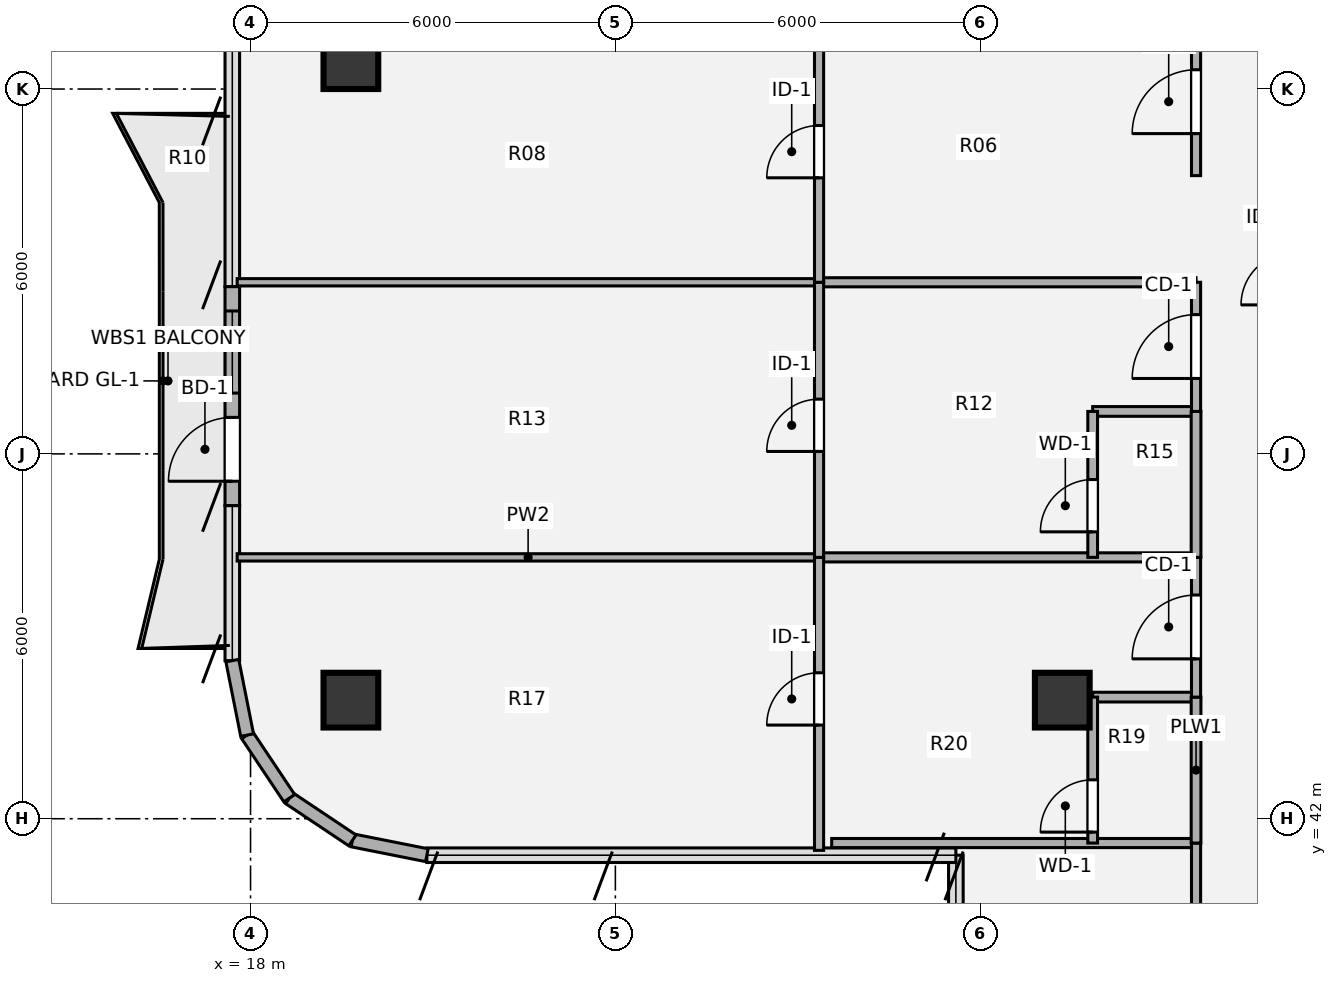
"""IFC4 building model, lengths in metres.
Left out: names, types, materials, properties, quantities, classifications, styles, units other than length and angle.
Written with IfcOpenShell. Run it as: python <this file> out.ifc"""

import sys

from ifc_helpers import new_model, si_unit, direction, frame, frame_2d, origin, origin_2d, place, context, subcontext, project, spatial, rectangle, hollow_circle, extrude, source, transform, mapped, element, fill, save


model = new_model("IFC4")
c1 = context("Model", 3, precision=1e-05, world=origin(), true_north=direction((0.0, 1.0)))
c2 = subcontext(c1, "Body", "Model", "MODEL_VIEW")
j1 = project(units=[si_unit("LENGTHUNIT", "METRE"), si_unit("PLANEANGLEUNIT", "RADIAN")], contexts=[c1])
p1 = place(None, origin())
s1 = spatial("IfcSite", under=j1, at=p1, CompositionType="ELEMENT")
p2 = place(p1, origin())
s2 = spatial("IfcBuilding", under=s1, at=p2, CompositionType="ELEMENT")
p3 = place(p2, frame((0.0, 0.0, 264.6)))
s3 = spatial("IfcBuildingStorey", under=s2, at=p3, CompositionType="ELEMENT", Elevation=264.6)
m1 = source(origin(), c2, "Body", "SweptSolid", [
    extrude(hollow_circle(Radius=0.45, WallThickness=0.032, at=origin_2d()), origin(), (0.0, 0.0, 1.0), 3.78),
])
for number, where, z_axis, x_axis in (
    (1, (19.65, 43.95, 0.0), (0.0, 0.0, 1.0), (1.0, 0.0, 0.0)),
    (2, (19.65, 54.45, 0.0), (0.0, 0.0, 1.0), (1.0, 0.0, 0.0)),
    (3, (31.35, 43.95, 0.0), (0.0, 0.0, 1.0), (1.0, 0.0, 0.0)),
):
    element("IfcColumn", number, at=place(p3, frame(where, z_axis=z_axis, x_axis=x_axis)), inside=s3, PredefinedType="COLUMN", context=c2, shape_type="MappedRepresentation", body=[
        mapped(m1, transform((0.0, 0.0, 0.0), x_axis=(1.0, 0.0, 0.0), y_axis=(0.0, 1.0, 0.0), z_axis=(0.0, 0.0, 1.0), scale=1.0)),
    ])
for number, where, z_axis, x_axis in (
    (4, (20.9, 41.4, 0.0), (0.0, 0.0, 1.0), (-0.981, 0.195, 0.0)),
    (5, (19.675, 41.644, 0.0), (0.0, 0.0, 1.0), (-0.831, 0.556, 0.0)),
    (6, (18.637, 42.337, 0.0), (0.0, 0.0, 1.0), (-0.556, 0.831, 0.0)),
    (7, (17.944, 43.375, 0.0), (0.0, 0.0, 1.0), (-0.195, 0.981, 0.0)),
):
    element("IfcWall", number, at=place(p3, frame(where, z_axis=z_axis, x_axis=x_axis)), inside=s3, PredefinedType="SOLIDWALL", context=c2, shape_type="SweptSolid", body=[
        extrude(rectangle(XDim=1.249, YDim=0.215, at=frame_2d((0.624, 0.0))), origin(), (0.0, 0.0, 1.0), 3.53),
    ])
p4 = place(p3, frame((17.7, 47.15, 0.0), z_axis=(0.0, 0.0, 1.0), x_axis=(0.0, 1.0, 0.0)))
e8 = element("IfcWall", 8, at=p4, inside=s3, PredefinedType="SOLIDWALL", context=c2, shape_type="SweptSolid", body=[
    extrude(rectangle(XDim=3.6, YDim=0.24, at=frame_2d((1.8, 0.0))), origin(), (0.0, 0.0, 1.0), 3.53),
])
p5 = place(p4, frame((0.4, 0.0, 0.0)))
e9 = element("IfcOpeningElement", 9, at=p5, cuts=e8, PredefinedType="OPENING", context=c2, shape_type="SweptSolid", body=[
    extrude(rectangle(XDim=1.05, YDim=2.15, at=origin_2d()), frame((0.525, 0.13, 1.075), z_axis=(0.0, -1.0, 0.0), x_axis=(1.0, 0.0, 0.0)), (0.0, 0.0, 1.0), 0.26),
])
p6 = place(p4, frame((1.85, 0.0, 0.85)))
e10 = element("IfcOpeningElement", 10, at=p6, cuts=e8, PredefinedType="OPENING", context=c2, shape_type="SweptSolid", body=[
    extrude(rectangle(XDim=1.35, YDim=1.35, at=origin_2d()), frame((0.675, 0.13, 0.675), z_axis=(0.0, -1.0, 0.0), x_axis=(1.0, 0.0, 0.0)), (0.0, 0.0, 1.0), 0.26),
])
p7 = place(p3, frame((27.558, 41.6, 0.0), z_axis=(0.0, 0.0, 1.0), x_axis=(1.0, 0.0, 0.0)))
e11 = element("IfcWall", 11, at=p7, inside=s3, PredefinedType="PARTITIONING", context=c2, shape_type="SweptSolid", body=[
    extrude(rectangle(XDim=5.992, YDim=0.15, at=frame_2d((2.996, 0.0))), origin(), (0.0, 0.0, 1.0), 3.5),
])
p8 = place(p3, frame((31.85, 44.0, 0.0), z_axis=(0.0, 0.0, 1.0), x_axis=(1.0, 0.0, 0.0)))
e12 = element("IfcWall", 12, at=p8, inside=s3, PredefinedType="PLUMBINGWALL", context=c2, shape_type="SweptSolid", body=[
    extrude(rectangle(XDim=1.7, YDim=0.16, at=frame_2d((0.85, 0.0))), origin(), (0.0, 0.0, 1.0), 2.903),
])
p9 = place(p3, frame((17.78, 46.298, 0.0), z_axis=(0.0, 0.0, 1.0), x_axis=(1.0, 0.0, 0.0)))
e13 = element("IfcWall", 13, at=p9, inside=s3, PredefinedType="PARTITIONING", context=c2, shape_type="SweptSolid", body=[
    extrude(rectangle(XDim=9.57, YDim=0.12, at=frame_2d((4.785, 0.0))), origin(), (0.0, 0.0, 1.0), 3.055),
])
p10 = place(p3, frame((27.35, 46.298, 0.0), z_axis=(0.0, 0.0, 1.0), x_axis=(1.0, 0.0, 0.0)))
e14 = element("IfcWall", 14, at=p10, inside=s3, PredefinedType="PARTITIONING", context=c2, shape_type="SweptSolid", body=[
    extrude(rectangle(XDim=6.2, YDim=0.15, at=frame_2d((3.1, 0.0))), origin(), (0.0, 0.0, 1.0), 3.055),
])
p11 = place(p3, frame((31.85, 48.698, 0.0), z_axis=(0.0, 0.0, 1.0), x_axis=(1.0, 0.0, 0.0)))
e15 = element("IfcWall", 15, at=p11, inside=s3, PredefinedType="PLUMBINGWALL", context=c2, shape_type="SweptSolid", body=[
    extrude(rectangle(XDim=1.7, YDim=0.16, at=frame_2d((0.85, 0.0))), origin(), (0.0, 0.0, 1.0), 3.259),
])
p12 = place(p3, frame((17.78, 50.822, 0.0), z_axis=(0.0, 0.0, 1.0), x_axis=(1.0, 0.0, 0.0)))
e16 = element("IfcWall", 16, at=p12, inside=s3, PredefinedType="PARTITIONING", context=c2, shape_type="SweptSolid", body=[
    extrude(rectangle(XDim=9.57, YDim=0.12, at=frame_2d((4.785, 0.0))), origin(), (0.0, 0.0, 1.0), 2.982),
])
p13 = place(p3, frame((27.35, 50.822, 0.0), z_axis=(0.0, 0.0, 1.0), x_axis=(1.0, 0.0, 0.0)))
e17 = element("IfcWall", 17, at=p13, inside=s3, PredefinedType="PARTITIONING", context=c2, shape_type="SweptSolid", body=[
    extrude(rectangle(XDim=6.2, YDim=0.15, at=frame_2d((3.1, 0.0))), origin(), (0.0, 0.0, 1.0), 2.982),
])
p14 = place(p3, frame((27.35, 41.48, 0.0), z_axis=(0.0, 0.0, 1.0), x_axis=(0.0, 1.0, 0.0)))
e18 = element("IfcWall", 18, at=p14, inside=s3, PredefinedType="PARTITIONING", context=c2, shape_type="SweptSolid", body=[
    extrude(rectangle(XDim=4.818, YDim=0.15, at=frame_2d((2.409, 0.0))), origin(), (0.0, 0.0, 1.0), 3.5),
])
p15 = place(p14, frame((2.06, 0.0, 0.0)))
e19 = element("IfcOpeningElement", 19, at=p15, cuts=e18, PredefinedType="OPENING", context=c2, shape_type="SweptSolid", body=[
    extrude(rectangle(XDim=0.86, YDim=2.1, at=origin_2d()), frame((0.43, 0.085, 1.05), z_axis=(0.0, -1.0, 0.0), x_axis=(1.0, 0.0, 0.0)), (0.0, 0.0, 1.0), 0.17),
])
p16 = place(p3, frame((27.35, 46.298, 0.0), z_axis=(0.0, 0.0, 1.0), x_axis=(0.0, 1.0, 0.0)))
e20 = element("IfcWall", 20, at=p16, inside=s3, PredefinedType="PARTITIONING", context=c2, shape_type="SweptSolid", body=[
    extrude(rectangle(XDim=4.524, YDim=0.15, at=frame_2d((2.262, 0.0))), origin(), (0.0, 0.0, 1.0), 3.5),
])
p17 = place(p16, frame((1.742, 0.0, 0.0)))
e21 = element("IfcOpeningElement", 21, at=p17, cuts=e20, PredefinedType="OPENING", context=c2, shape_type="SweptSolid", body=[
    extrude(rectangle(XDim=0.86, YDim=2.1, at=origin_2d()), frame((0.43, 0.085, 1.05), z_axis=(0.0, -1.0, 0.0), x_axis=(1.0, 0.0, 0.0)), (0.0, 0.0, 1.0), 0.17),
])
p18 = place(p3, frame((27.35, 50.822, 0.0), z_axis=(0.0, 0.0, 1.0), x_axis=(0.0, 1.0, 0.0)))
e22 = element("IfcWall", 22, at=p18, inside=s3, PredefinedType="PARTITIONING", context=c2, shape_type="SweptSolid", body=[
    extrude(rectangle(XDim=4.176, YDim=0.15, at=frame_2d((2.088, 0.0))), origin(), (0.0, 0.0, 1.0), 3.5),
])
p19 = place(p18, frame((1.718, 0.0, 0.0)))
e23 = element("IfcOpeningElement", 23, at=p19, cuts=e22, PredefinedType="OPENING", context=c2, shape_type="SweptSolid", body=[
    extrude(rectangle(XDim=0.86, YDim=2.1, at=origin_2d()), frame((0.43, 0.085, 1.05), z_axis=(0.0, -1.0, 0.0), x_axis=(1.0, 0.0, 0.0)), (0.0, 0.0, 1.0), 0.17),
])
p20 = place(p3, frame((31.85, 41.6, 0.0), z_axis=(0.0, 0.0, 1.0), x_axis=(0.0, 1.0, 0.0)))
e24 = element("IfcWall", 24, at=p20, inside=s3, PredefinedType="PLUMBINGWALL", context=c2, shape_type="SweptSolid", body=[
    extrude(rectangle(XDim=2.4, YDim=0.16, at=frame_2d((1.2, 0.0))), origin(), (0.0, 0.0, 1.0), 3.5),
])
p21 = place(p20, frame((0.18, 0.0, 0.0)))
e25 = element("IfcOpeningElement", 25, at=p21, cuts=e24, PredefinedType="OPENING", context=c2, shape_type="SweptSolid", body=[
    extrude(rectangle(XDim=0.86, YDim=2.1, at=origin_2d()), frame((0.43, 0.09, 1.05), z_axis=(0.0, -1.0, 0.0), x_axis=(1.0, 0.0, 0.0)), (0.0, 0.0, 1.0), 0.18),
])
p22 = place(p3, frame((31.85, 46.298, 0.0), z_axis=(0.0, 0.0, 1.0), x_axis=(0.0, 1.0, 0.0)))
e26 = element("IfcWall", 26, at=p22, inside=s3, PredefinedType="PLUMBINGWALL", context=c2, shape_type="SweptSolid", body=[
    extrude(rectangle(XDim=2.4, YDim=0.16, at=frame_2d((1.2, 0.0))), origin(), (0.0, 0.0, 1.0), 3.5),
])
p23 = place(p22, frame((0.42, 0.0, 0.0)))
e27 = element("IfcOpeningElement", 27, at=p23, cuts=e26, PredefinedType="OPENING", context=c2, shape_type="SweptSolid", body=[
    extrude(rectangle(XDim=0.86, YDim=2.1, at=origin_2d()), frame((0.43, 0.09, 1.05), z_axis=(0.0, -1.0, 0.0), x_axis=(1.0, 0.0, 0.0)), (0.0, 0.0, 1.0), 0.18),
])
p24 = place(p3, frame((33.55, 21.2, 0.0), z_axis=(0.0, 0.0, 1.0), x_axis=(0.0, 1.0, 0.0)))
e28 = element("IfcWall", 28, at=p24, inside=s3, PredefinedType="PARTITIONING", context=c2, shape_type="SweptSolid", body=[
    extrude(rectangle(XDim=20.4, YDim=0.15, at=frame_2d((10.2, 0.0))), origin(), (0.0, 0.0, 1.0), 3.5),
])
p25 = place(p24, frame((9.64, 0.0, 0.0)))
e29 = element("IfcOpeningElement", 29, at=p25, cuts=e28, PredefinedType="OPENING", context=c2, shape_type="SweptSolid", body=[
    extrude(rectangle(XDim=0.86, YDim=2.1, at=origin_2d()), frame((0.43, 0.085, 1.05), z_axis=(0.0, -1.0, 0.0), x_axis=(1.0, 0.0, 0.0)), (0.0, 0.0, 1.0), 0.17),
])
p26 = place(p3, frame((33.55, 41.6, 0.0), z_axis=(0.0, 0.0, 1.0), x_axis=(0.0, 1.0, 0.0)))
e30 = element("IfcWall", 30, at=p26, inside=s3, PredefinedType="PLUMBINGWALL", context=c2, shape_type="SweptSolid", body=[
    extrude(rectangle(XDim=2.4, YDim=0.16, at=frame_2d((1.2, 0.0))), origin(), (0.0, 0.0, 1.0), 3.5),
])
p27 = place(p3, frame((33.55, 44.0, 0.0), z_axis=(0.0, 0.0, 1.0), x_axis=(0.0, 1.0, 0.0)))
e31 = element("IfcWall", 31, at=p27, inside=s3, PredefinedType="PARTITIONING", context=c2, shape_type="SweptSolid", body=[
    extrude(rectangle(XDim=2.298, YDim=0.15, at=frame_2d((1.149, 0.0))), origin(), (0.0, 0.0, 1.0), 3.5),
])
p28 = place(p27, frame((0.629, 0.0, 0.0)))
e32 = element("IfcOpeningElement", 32, at=p28, cuts=e31, PredefinedType="OPENING", context=c2, shape_type="SweptSolid", body=[
    extrude(rectangle(XDim=1.05, YDim=2.1, at=origin_2d()), frame((0.525, 0.085, 1.05), z_axis=(0.0, -1.0, 0.0), x_axis=(1.0, 0.0, 0.0)), (0.0, 0.0, 1.0), 0.17),
])
p29 = place(p3, frame((33.55, 46.298, 0.0), z_axis=(0.0, 0.0, 1.0), x_axis=(0.0, 1.0, 0.0)))
e33 = element("IfcWall", 33, at=p29, inside=s3, PredefinedType="PLUMBINGWALL", context=c2, shape_type="SweptSolid", body=[
    extrude(rectangle(XDim=2.4, YDim=0.16, at=frame_2d((1.2, 0.0))), origin(), (0.0, 0.0, 1.0), 3.5),
])
p30 = place(p3, frame((33.55, 48.698, 0.0), z_axis=(0.0, 0.0, 1.0), x_axis=(0.0, 1.0, 0.0)))
e34 = element("IfcWall", 34, at=p30, inside=s3, PredefinedType="PARTITIONING", context=c2, shape_type="SweptSolid", body=[
    extrude(rectangle(XDim=2.124, YDim=0.15, at=frame_2d((1.062, 0.0))), origin(), (0.0, 0.0, 1.0), 3.5),
])
p31 = place(p30, frame((0.542, 0.0, 0.0)))
e35 = element("IfcOpeningElement", 35, at=p31, cuts=e34, PredefinedType="OPENING", context=c2, shape_type="SweptSolid", body=[
    extrude(rectangle(XDim=1.05, YDim=2.1, at=origin_2d()), frame((0.525, 0.085, 1.05), z_axis=(0.0, -1.0, 0.0), x_axis=(1.0, 0.0, 0.0)), (0.0, 0.0, 1.0), 0.17),
])
p32 = place(p3, frame((33.55, 52.576, 0.0), z_axis=(0.0, 0.0, 1.0), x_axis=(0.0, 1.0, 0.0)))
e36 = element("IfcWall", 36, at=p32, inside=s3, PredefinedType="PARTITIONING", context=c2, shape_type="SweptSolid", body=[
    extrude(rectangle(XDim=2.422, YDim=0.15, at=frame_2d((1.211, 0.0))), origin(), (0.0, 0.0, 1.0), 3.5),
])
p33 = place(p32, frame((0.691, 0.0, 0.0)))
e37 = element("IfcOpeningElement", 37, at=p33, cuts=e36, PredefinedType="OPENING", context=c2, shape_type="SweptSolid", body=[
    extrude(rectangle(XDim=1.05, YDim=2.1, at=origin_2d()), frame((0.525, 0.085, 1.05), z_axis=(0.0, -1.0, 0.0), x_axis=(1.0, 0.0, 0.0)), (0.0, 0.0, 1.0), 0.17),
])
m2 = source(origin(), c2, "Body", "SweptSolid", [
    extrude(rectangle(XDim=1.05, YDim=2.15, at=origin_2d()), frame((0.525, 0.025, 1.075), z_axis=(0.0, -1.0, 0.0), x_axis=(1.0, 0.0, 0.0)), (0.0, 0.0, 1.0), 0.05),
])
p34 = place(p5, origin())
e38 = element("IfcDoor", 38, at=p34, inside=s3, OperationType="SINGLE_SWING_LEFT", PredefinedType="DOOR", context=c2, shape_type="MappedRepresentation", body=[
    mapped(m2, transform((0.0, 0.0, 0.0), x_axis=(1.0, 0.0, 0.0), y_axis=(0.0, 1.0, 0.0), z_axis=(0.0, 0.0, 1.0), scale=1.0)),
])
fill(e9, e38)
m3 = source(origin(), c2, "Body", "SweptSolid", [
    extrude(rectangle(XDim=1.35, YDim=1.35, at=origin_2d()), frame((0.675, 0.03, 0.675), z_axis=(0.0, -1.0, 0.0), x_axis=(1.0, 0.0, 0.0)), (0.0, 0.0, 1.0), 0.06),
])
p35 = place(p6, origin())
e39 = element("IfcWindow", 39, at=p35, inside=s3, PartitioningType="SINGLE_PANEL", PredefinedType="WINDOW", context=c2, shape_type="MappedRepresentation", body=[
    mapped(m3, transform((0.0, 0.0, 0.0), x_axis=(1.0, 0.0, 0.0), y_axis=(0.0, 1.0, 0.0), z_axis=(0.0, 0.0, 1.0), scale=1.0)),
])
fill(e10, e39)
m4 = source(origin(), c2, "Body", "SweptSolid", [
    extrude(rectangle(XDim=0.86, YDim=2.1, at=origin_2d()), frame((0.43, 0.025, 1.05), z_axis=(0.0, -1.0, 0.0), x_axis=(1.0, 0.0, 0.0)), (0.0, 0.0, 1.0), 0.05),
])
p36 = place(p15, origin())
e40 = element("IfcDoor", 40, at=p36, inside=s3, OperationType="SINGLE_SWING_LEFT", PredefinedType="DOOR", context=c2, shape_type="MappedRepresentation", body=[
    mapped(m4, transform((0.0, 0.0, 0.0), x_axis=(1.0, 0.0, 0.0), y_axis=(0.0, 1.0, 0.0), z_axis=(0.0, 0.0, 1.0), scale=1.0)),
])
fill(e19, e40)
p37 = place(p17, origin())
e41 = element("IfcDoor", 41, at=p37, inside=s3, OperationType="SINGLE_SWING_LEFT", PredefinedType="DOOR", context=c2, shape_type="MappedRepresentation", body=[
    mapped(m4, transform((0.0, 0.0, 0.0), x_axis=(1.0, 0.0, 0.0), y_axis=(0.0, 1.0, 0.0), z_axis=(0.0, 0.0, 1.0), scale=1.0)),
])
fill(e21, e41)
p38 = place(p19, origin())
e42 = element("IfcDoor", 42, at=p38, inside=s3, OperationType="SINGLE_SWING_LEFT", PredefinedType="DOOR", context=c2, shape_type="MappedRepresentation", body=[
    mapped(m4, transform((0.0, 0.0, 0.0), x_axis=(1.0, 0.0, 0.0), y_axis=(0.0, 1.0, 0.0), z_axis=(0.0, 0.0, 1.0), scale=1.0)),
])
fill(e23, e42)
m5 = source(origin(), c2, "Body", "SweptSolid", [
    extrude(rectangle(XDim=0.86, YDim=2.1, at=origin_2d()), frame((0.43, 0.025, 1.05), z_axis=(0.0, -1.0, 0.0), x_axis=(1.0, 0.0, 0.0)), (0.0, 0.0, 1.0), 0.05),
])
p39 = place(p21, origin())
e43 = element("IfcDoor", 43, at=p39, inside=s3, OperationType="SINGLE_SWING_LEFT", PredefinedType="DOOR", context=c2, shape_type="MappedRepresentation", body=[
    mapped(m5, transform((0.0, 0.0, 0.0), x_axis=(1.0, 0.0, 0.0), y_axis=(0.0, 1.0, 0.0), z_axis=(0.0, 0.0, 1.0), scale=1.0)),
])
fill(e25, e43)
p40 = place(p23, origin())
e44 = element("IfcDoor", 44, at=p40, inside=s3, OperationType="SINGLE_SWING_LEFT", PredefinedType="DOOR", context=c2, shape_type="MappedRepresentation", body=[
    mapped(m5, transform((0.0, 0.0, 0.0), x_axis=(1.0, 0.0, 0.0), y_axis=(0.0, 1.0, 0.0), z_axis=(0.0, 0.0, 1.0), scale=1.0)),
])
fill(e27, e44)
m6 = source(origin(), c2, "Body", "SweptSolid", [
    extrude(rectangle(XDim=1.05, YDim=2.1, at=origin_2d()), frame((0.525, 0.025, 1.05), z_axis=(0.0, -1.0, 0.0), x_axis=(1.0, 0.0, 0.0)), (0.0, 0.0, 1.0), 0.05),
])
p41 = place(p28, origin())
e45 = element("IfcDoor", 45, at=p41, inside=s3, OperationType="SINGLE_SWING_LEFT", PredefinedType="DOOR", context=c2, shape_type="MappedRepresentation", body=[
    mapped(m6, transform((0.0, 0.0, 0.0), x_axis=(1.0, 0.0, 0.0), y_axis=(0.0, 1.0, 0.0), z_axis=(0.0, 0.0, 1.0), scale=1.0)),
])
fill(e32, e45)
p42 = place(p31, origin())
e46 = element("IfcDoor", 46, at=p42, inside=s3, OperationType="SINGLE_SWING_LEFT", PredefinedType="DOOR", context=c2, shape_type="MappedRepresentation", body=[
    mapped(m6, transform((0.0, 0.0, 0.0), x_axis=(1.0, 0.0, 0.0), y_axis=(0.0, 1.0, 0.0), z_axis=(0.0, 0.0, 1.0), scale=1.0)),
])
fill(e35, e46)
p43 = place(p33, origin())
e47 = element("IfcDoor", 47, at=p43, inside=s3, OperationType="SINGLE_SWING_LEFT", PredefinedType="DOOR", context=c2, shape_type="MappedRepresentation", body=[
    mapped(m6, transform((0.0, 0.0, 0.0), x_axis=(1.0, 0.0, 0.0), y_axis=(0.0, 1.0, 0.0), z_axis=(0.0, 0.0, 1.0), scale=1.0)),
])
fill(e37, e47)
save(model, sys.argv[1])
